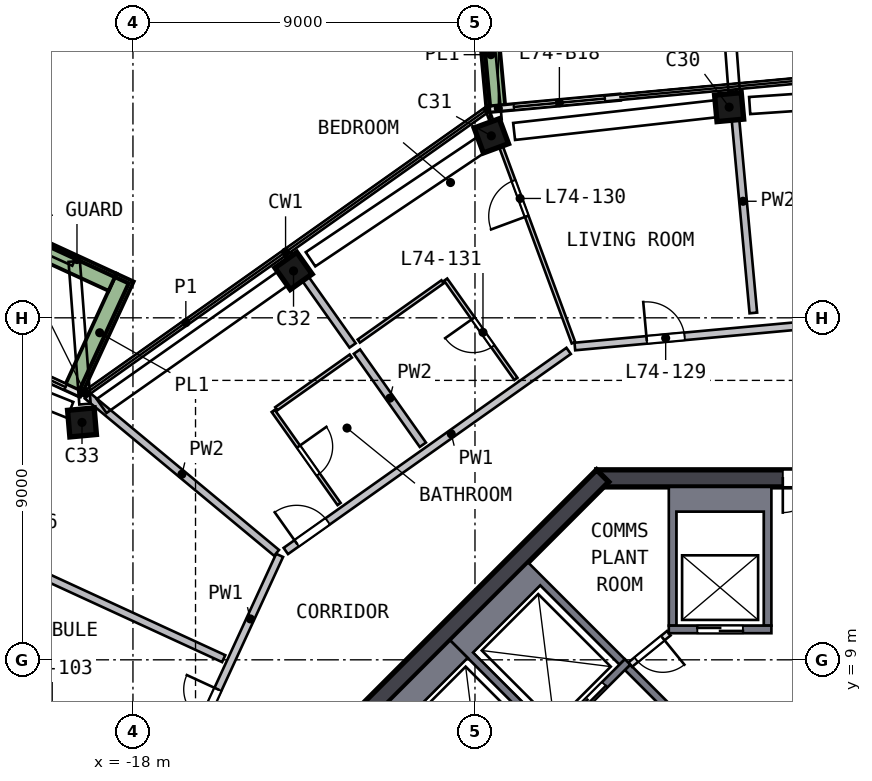
"""IFC4 building model, lengths in metres.
Left out: names, types, materials, properties, quantities, classifications, styles, units other than length and angle.
Written with IfcOpenShell. Run it as: python <this file> out.ifc"""

import sys

from ifc_helpers import new_model, si_unit, direction, frame, frame_2d, origin, origin_2d, place, context, subcontext, project, spatial, polyline, rectangle, outline, extrude, element, fill, save


model = new_model("IFC4")
c1 = context("Model", 3, precision=1e-05, world=origin(), true_north=direction((0.0, 1.0)))
c2 = subcontext(c1, "Body", "Model", "MODEL_VIEW")
j1 = project(units=[si_unit("LENGTHUNIT", "METRE"), si_unit("PLANEANGLEUNIT", "RADIAN")], contexts=[c1])
p1 = place(None, origin())
s1 = spatial("IfcSite", under=j1, at=p1, CompositionType="ELEMENT")
p2 = place(p1, origin())
s2 = spatial("IfcBuilding", under=s1, at=p2, CompositionType="ELEMENT")
p3 = place(p2, frame((0.0, 0.0, 299.5)))
s3 = spatial("IfcBuildingStorey", under=s2, at=p3, CompositionType="ELEMENT", Elevation=299.5)
p4 = place(p3, frame((-2.177, 23.558, 0.0), z_axis=(-0.112018614, -0.011255095, 0.993642367), x_axis=(-0.989472259, -0.090943405, -0.112578621)))
e1 = element("IfcColumn", 1, at=p4, inside=s3, PredefinedType="COLUMN", context=c2, shape_type="SweptSolid", body=[
    extrude(rectangle(XDim=0.7, YDim=0.7, at=origin_2d()), origin(), (0.0, 0.0, 1.0), 3.21),
])
p5 = place(p3, frame((-8.439, 22.839, 0.0), z_axis=(-0.108252285, -0.041050726, 0.993275531), x_axis=(0.931697214, 0.344292806, 0.115770316)))
e2 = element("IfcColumn", 2, at=p5, inside=s3, PredefinedType="COLUMN", context=c2, shape_type="SweptSolid", body=[
    extrude(rectangle(XDim=0.7, YDim=0.7, at=origin_2d()), origin(), (0.0, 0.0, 1.0), 3.211),
])
p6 = place(p3, frame((-13.664, 19.313, 0.0), z_axis=(-0.09133384, -0.065781659, 0.99364526), x_axis=(-0.811187112, -0.573853007, -0.112553082)))
e3 = element("IfcColumn", 3, at=p6, inside=s3, PredefinedType="COLUMN", context=c2, shape_type="SweptSolid", body=[
    extrude(rectangle(XDim=0.7, YDim=0.7, at=origin_2d()), origin(), (0.0, 0.0, 1.0), 3.21),
])
p7 = place(p3, frame((-19.253, 15.359, 0.0), z_axis=(-0.072283618, -0.092121709, 0.993120672), x_axis=(0.993191737, 0.084552132, 0.080131833)))
e4 = element("IfcColumn", 4, at=p7, inside=s3, PredefinedType="COLUMN", context=c2, shape_type="SweptSolid", body=[
    extrude(rectangle(XDim=0.7, YDim=0.7, at=origin_2d()), origin(), (0.0, 0.0, 1.0), 3.212),
])
p8 = place(p3, frame((5.799, 13.775, 0.0), z_axis=(0.0, 0.0, 1.0), x_axis=(-1.0, 0.0, 0.0)))
e5 = element("IfcWall", 5, at=p8, inside=s3, PredefinedType="SHEAR", context=c2, shape_type="SweptSolid", body=[
    extrude(rectangle(XDim=11.598, YDim=0.45, at=frame_2d((5.799, 0.0))), origin(), (0.0, 0.0, 1.0), 3.5),
])
p9 = place(p8, frame((4.899, 0.0, 0.0)))
e6 = element("IfcOpeningElement", 6, at=p9, cuts=e5, PredefinedType="OPENING", context=c2, shape_type="SweptSolid", body=[
    extrude(rectangle(XDim=1.8, YDim=2.1, at=frame_2d((0.9, 1.05))), frame((0.0, 0.235, 0.0), z_axis=(0.0, -1.0, 0.0), x_axis=(1.0, 0.0, 0.0)), (0.0, 0.0, 1.0), 0.47),
])
p10 = place(p3, frame((-5.64, 13.841, 0.0), z_axis=(0.0, 0.0, 1.0), x_axis=(-0.707106781, -0.707106781, 0.0)))
e7 = element("IfcWall", 7, at=p10, inside=s3, PredefinedType="SHEAR", context=c2, shape_type="SweptSolid", body=[
    extrude(rectangle(XDim=11.598, YDim=0.45, at=frame_2d((5.799, 0.0))), origin(), (0.0, 0.0, 1.0), 3.5),
])
p11 = place(p3, frame((-19.412, 16.01, 0.0), z_axis=(0.0, 0.0, 1.0), x_axis=(-0.908367596, 0.418172585, 0.0)))
e8 = element("IfcWall", 8, at=p11, inside=s3, PredefinedType="SOLIDWALL", context=c2, shape_type="SweptSolid", body=[
    extrude(rectangle(XDim=3.2, YDim=0.15, at=frame_2d((1.6, 0.0))), origin(), (0.0, 0.0, 1.0), 2.525),
])
p12 = place(p11, frame((0.4, 0.0, 0.0)))
e9 = element("IfcOpeningElement", 9, at=p12, cuts=e8, PredefinedType="OPENING", context=c2, shape_type="SweptSolid", body=[
    extrude(rectangle(XDim=2.4, YDim=2.4, at=frame_2d((1.2, 1.2))), frame((0.0, 0.085, 0.0), z_axis=(0.0, -1.0, 0.0), x_axis=(1.0, 0.0, 0.0)), (0.0, 0.0, 1.0), 0.17),
])
p13 = place(p3, frame((-5.186, 23.807, 0.0), z_axis=(0.0, 0.0, 1.0), x_axis=(-0.995754833, -0.092045163, 0.0)))
e10 = element("IfcWall", 10, at=p13, inside=s3, PredefinedType="SOLIDWALL", context=c2, shape_type="SweptSolid", body=[
    extrude(rectangle(XDim=3.427, YDim=0.15, at=frame_2d((1.713, 0.0))), origin(), (0.0, 0.0, 1.0), 2.525),
])
p14 = place(p13, frame((0.4, 0.0, 0.0)))
e11 = element("IfcOpeningElement", 11, at=p14, cuts=e10, PredefinedType="OPENING", context=c2, shape_type="SweptSolid", body=[
    extrude(rectangle(XDim=2.4, YDim=2.4, at=frame_2d((1.2, 1.2))), frame((0.0, 0.085, 0.0), z_axis=(0.0, -1.0, 0.0), x_axis=(1.0, 0.0, 0.0)), (0.0, 0.0, 1.0), 0.17),
])
p15 = place(p3, frame((-8.704, 26.269, 0.0), z_axis=(0.0, 0.0, 1.0), x_axis=(0.092085269, -0.995751125, 0.0)))
e12 = element("IfcWall", 12, at=p15, inside=s3, PredefinedType="SOLIDWALL", context=c2, shape_type="SweptSolid", body=[
    extrude(rectangle(XDim=2.699, YDim=0.5, at=frame_2d((1.35, 0.0))), origin(), (0.0, 0.0, 1.0), 0.7),
])
p16 = place(p3, frame((-19.544, 16.154, 0.0), z_axis=(0.0, 0.0, 1.0), x_axis=(0.418225571, 0.908343202, 0.0)))
e13 = element("IfcWall", 13, at=p16, inside=s3, PredefinedType="SOLIDWALL", context=c2, shape_type="SweptSolid", body=[
    extrude(rectangle(XDim=3.199, YDim=0.5, at=frame_2d((1.6, 0.0))), origin(), (0.0, 0.0, 1.0), 0.7),
])
p17 = place(p3, frame((-18.538, 18.938, 0.0), z_axis=(0.0, 0.0, 1.0), x_axis=(-0.908360009, 0.418189066, 0.0)))
e14 = element("IfcWall", 14, at=p17, inside=s3, PredefinedType="SOLIDWALL", context=c2, shape_type="SweptSolid", body=[
    extrude(rectangle(XDim=9.426, YDim=0.5, at=frame_2d((4.713, 0.0))), origin(), (0.0, 0.0, 1.0), 0.7),
])
p18 = place(p3, origin())
e15 = element("IfcWall", 15, at=p18, inside=s3, PredefinedType="SOLIDWALL", context=c2, shape_type="SweptSolid", body=[
    extrude(outline(polyline([(-3.9, 13.55), (-1.2, 13.55), (-1.2, 9.9), (-1.4, 9.9), (-1.4, 12.9), (-3.7, 12.9), (-3.7, 9.9), (-3.9, 9.9), (-3.9, 13.55)])), origin(), (0.0, 0.0, 1.0), 3.19),
])
p19 = place(p3, frame((-1.2, 9.8, 0.0), z_axis=(0.0, 0.0, 1.0), x_axis=(-1.0, 0.0, 0.0)))
e16 = element("IfcWall", 16, at=p19, inside=s3, PredefinedType="SOLIDWALL", context=c2, shape_type="SweptSolid", body=[
    extrude(rectangle(XDim=2.7, YDim=0.2, at=frame_2d((1.35, 0.0))), origin(), (0.0, 0.0, 1.0), 3.19),
])
p20 = place(p19, frame((0.75, 0.0, 0.0)))
e17 = element("IfcOpeningElement", 17, at=p20, cuts=e16, PredefinedType="OPENING", context=c2, shape_type="SweptSolid", body=[
    extrude(rectangle(XDim=1.2, YDim=2.1, at=frame_2d((0.6, 1.05))), frame((0.0, 0.11, 0.0), z_axis=(0.0, -1.0, 0.0), x_axis=(1.0, 0.0, 0.0)), (0.0, 0.0, 1.0), 0.22),
])
p21 = place(p3, origin())
e18 = element("IfcWall", 18, at=p21, inside=s3, PredefinedType="SOLIDWALL", context=c2, shape_type="SweptSolid", body=[
    extrude(outline(polyline([(-9.652, 9.51), (-7.601, 11.561), (-5.056, 9.016), (-5.197, 8.874), (-7.283, 10.96), (-9.051, 9.192), (-6.965, 7.106), (-7.106, 6.965), (-9.652, 9.51)])), origin(), (0.0, 0.0, 1.0), 3.19),
])
p22 = place(p3, frame((-4.985, 8.945, 0.0), z_axis=(0.0, 0.0, 1.0), x_axis=(-0.707106781, -0.707106781, 0.0)))
e19 = element("IfcWall", 19, at=p22, inside=s3, PredefinedType="SOLIDWALL", context=c2, shape_type="SweptSolid", body=[
    extrude(rectangle(XDim=2.9, YDim=0.2, at=frame_2d((1.45, 0.0))), origin(), (0.0, 0.0, 1.0), 3.19),
])
p23 = place(p22, frame((0.85, 0.0, 0.0)))
e20 = element("IfcOpeningElement", 20, at=p23, cuts=e19, PredefinedType="OPENING", context=c2, shape_type="SweptSolid", body=[
    extrude(rectangle(XDim=1.2, YDim=2.1, at=frame_2d((0.6, 1.05))), frame((0.0, 0.11, 0.0), z_axis=(0.0, -1.0, 0.0), x_axis=(1.0, 0.0, 0.0)), (0.0, 0.0, 1.0), 0.22),
])
p24 = place(p3, origin())
e21 = element("IfcWall", 21, at=p24, inside=s3, PredefinedType="SOLIDWALL", context=c2, shape_type="SweptSolid", body=[
    extrude(outline(polyline([(-11.561, 7.601), (-9.652, 9.51), (-9.192, 9.051), (-10.96, 7.283), (-8.874, 5.197), (-9.016, 5.056), (-11.561, 7.601)])), origin(), (0.0, 0.0, 1.0), 3.19),
])
p25 = place(p3, frame((-3.005, 6.823, 0.0), z_axis=(0.0, 0.0, 1.0), x_axis=(-0.707106781, 0.707106781, 0.0)))
e22 = element("IfcWall", 22, at=p25, inside=s3, PredefinedType="SOLIDWALL", context=c2, shape_type="SweptSolid", body=[
    extrude(rectangle(XDim=2.8, YDim=0.2, at=frame_2d((1.4, 0.0))), origin(), (0.0, 0.0, 1.0), 3.19),
])
p26 = place(p3, frame((-3.9, 9.7, 0.0), z_axis=(0.0, 0.0, 1.0), x_axis=(-0.775559878, -0.631274009, 0.0)))
e23 = element("IfcWall", 23, at=p26, inside=s3, PredefinedType="PARTITIONING", context=c2, shape_type="SweptSolid", body=[
    extrude(rectangle(XDim=1.308, YDim=0.15, at=frame_2d((0.654, 0.0))), origin(), (0.0, 0.0, 1.0), 3.19),
])
p27 = place(p26, frame((0.204, 0.0, 0.0)))
e24 = element("IfcOpeningElement", 24, at=p27, cuts=e23, PredefinedType="OPENING", context=c2, shape_type="SweptSolid", body=[
    extrude(rectangle(XDim=0.9, YDim=2.1, at=frame_2d((0.45, 1.05))), frame((0.0, 0.085, 0.0), z_axis=(0.0, -1.0, 0.0), x_axis=(1.0, 0.0, 0.0)), (0.0, 0.0, 1.0), 0.17),
])
p28 = place(p3, frame((-18.121, 3.104, 0.0), z_axis=(0.0, 0.0, 1.0), x_axis=(0.418187622, 0.908360673, 0.0)))
e25 = element("IfcWall", 25, at=p28, inside=s3, PredefinedType="SOLIDWALL", context=c2, shape_type="SweptSolid", body=[
    extrude(rectangle(XDim=9.517, YDim=0.2, at=frame_2d((4.758, 0.0))), origin(), (0.0, 0.0, 1.0), 3.19),
])
p29 = place(p28, frame((3.835, 0.0, 0.0)))
e26 = element("IfcOpeningElement", 26, at=p29, cuts=e25, PredefinedType="OPENING", context=c2, shape_type="SweptSolid", body=[
    extrude(rectangle(XDim=1.8, YDim=2.1, at=frame_2d((0.9, 1.05))), frame((0.0, 0.11, 0.0), z_axis=(0.0, -1.0, 0.0), x_axis=(1.0, 0.0, 0.0)), (0.0, 0.0, 1.0), 0.22),
])
p30 = place(p3, frame((-13.978, 11.864, 0.0), z_axis=(0.0, 0.0, 1.0), x_axis=(0.8163291, 0.57758705, 0.0)))
e27 = element("IfcWall", 27, at=p30, inside=s3, PredefinedType="SOLIDWALL", context=c2, shape_type="SweptSolid", body=[
    extrude(rectangle(XDim=9.117, YDim=0.2, at=frame_2d((4.558, 0.0))), origin(), (0.0, 0.0, 1.0), 3.19),
])
p31 = place(p30, frame((0.35, 0.0, 0.0)))
e28 = element("IfcOpeningElement", 28, at=p31, cuts=e27, PredefinedType="OPENING", context=c2, shape_type="SweptSolid", body=[
    extrude(rectangle(XDim=1.0, YDim=2.1, at=frame_2d((0.5, 1.05))), frame((0.0, 0.11, 0.0), z_axis=(0.0, -1.0, 0.0), x_axis=(1.0, 0.0, 0.0)), (0.0, 0.0, 1.0), 0.22),
])
p32 = place(p3, frame((-6.372, 17.245, 0.0), z_axis=(0.0, 0.0, 1.0), x_axis=(0.995758077, 0.092010069, 0.0)))
e29 = element("IfcWall", 29, at=p32, inside=s3, PredefinedType="SOLIDWALL", context=c2, shape_type="SweptSolid", body=[
    extrude(rectangle(XDim=9.316, YDim=0.2, at=frame_2d((4.658, 0.0))), origin(), (0.0, 0.0, 1.0), 3.19),
])
p33 = place(p32, frame((1.9, 0.0, 0.0)))
e30 = element("IfcOpeningElement", 30, at=p33, cuts=e29, PredefinedType="OPENING", context=c2, shape_type="SweptSolid", body=[
    extrude(rectangle(XDim=1.0, YDim=2.1, at=frame_2d((0.5, 1.05))), frame((0.0, 0.11, 0.0), z_axis=(0.0, -1.0, 0.0), x_axis=(1.0, 0.0, 0.0)), (0.0, 0.0, 1.0), 0.22),
])
p34 = place(p3, frame((-16.992, 6.035, 0.0), z_axis=(0.0, 0.0, 1.0), x_axis=(-0.908362647, 0.418183336, 0.0)))
e31 = element("IfcWall", 31, at=p34, inside=s3, PredefinedType="SOLIDWALL", context=c2, shape_type="SweptSolid", body=[
    extrude(rectangle(XDim=10.302, YDim=0.2, at=frame_2d((5.151, 0.0))), origin(), (0.0, 0.0, 1.0), 3.19),
])
p35 = place(p34, frame((2.95, 0.0, 0.0)))
e32 = element("IfcOpeningElement", 32, at=p35, cuts=e31, PredefinedType="OPENING", context=c2, shape_type="SweptSolid", body=[
    extrude(rectangle(XDim=1.0, YDim=2.1, at=frame_2d((0.5, 1.05))), frame((0.0, 0.11, 0.0), z_axis=(0.0, -1.0, 0.0), x_axis=(1.0, 0.0, 0.0)), (0.0, 0.0, 1.0), 0.22),
])
p36 = place(p3, frame((-24.97, 13.339, 0.0), z_axis=(0.0, 0.0, 1.0), x_axis=(0.908362647, -0.418183336, 0.0)))
e33 = element("IfcWall", 33, at=p36, inside=s3, PredefinedType="SOLIDWALL", context=c2, shape_type="SweptSolid", body=[
    extrude(rectangle(XDim=10.302, YDim=0.2, at=frame_2d((5.151, 0.0))), origin(), (0.0, 0.0, 1.0), 3.19),
])
p37 = place(p36, frame((2.5, 0.0, 0.0)))
e34 = element("IfcOpeningElement", 34, at=p37, cuts=e33, PredefinedType="OPENING", context=c2, shape_type="SweptSolid", body=[
    extrude(rectangle(XDim=1.0, YDim=2.1, at=frame_2d((0.5, 1.05))), frame((0.0, 0.11, 0.0), z_axis=(0.0, -1.0, 0.0), x_axis=(1.0, 0.0, 0.0)), (0.0, 0.0, 1.0), 0.22),
])
p38 = place(p3, frame((-19.202, 15.953, 0.0), z_axis=(0.0, 0.0, 1.0), x_axis=(0.769193794, -0.639015577, 0.0)))
e35 = element("IfcWall", 35, at=p38, inside=s3, PredefinedType="SOLIDWALL", context=c2, shape_type="SweptSolid", body=[
    extrude(rectangle(XDim=6.476, YDim=0.2, at=frame_2d((3.238, 0.0))), origin(), (0.0, 0.0, 1.0), 3.19),
])
p39 = place(p3, frame((-12.22, 17.272, 0.0), z_axis=(0.0, 0.0, 1.0), x_axis=(-0.577576384, 0.816336646, 0.0)))
e36 = element("IfcWall", 36, at=p39, inside=s3, PredefinedType="SOLIDWALL", context=c2, shape_type="SweptSolid", body=[
    extrude(rectangle(XDim=2.95, YDim=0.2, at=frame_2d((1.475, 0.0))), origin(), (0.0, 0.0, 1.0), 3.19),
])
p40 = place(p3, frame((-10.372, 14.66, 0.0), z_axis=(0.0, 0.0, 1.0), x_axis=(-0.57760883, 0.81631369, 0.0)))
e37 = element("IfcWall", 37, at=p40, inside=s3, PredefinedType="SOLIDWALL", context=c2, shape_type="SweptSolid", body=[
    extrude(rectangle(XDim=3.002, YDim=0.2, at=frame_2d((1.501, 0.0))), origin(), (0.0, 0.0, 1.0), 3.19),
])
p41 = place(p3, frame((-1.675, 18.128, 0.0), z_axis=(0.0, 0.0, 1.0), x_axis=(-0.092027338, 0.995756481, 0.0)))
e38 = element("IfcWall", 38, at=p41, inside=s3, PredefinedType="SOLIDWALL", context=c2, shape_type="SweptSolid", body=[
    extrude(rectangle(XDim=5.903, YDim=0.2, at=frame_2d((2.951, 0.0))), origin(), (0.0, 0.0, 1.0), 3.19),
])
p42 = place(p3, frame((-14.309, 15.55, 0.0), z_axis=(0.0, 0.0, 1.0), x_axis=(0.577529543, -0.816369786, 0.0)))
e39 = element("IfcWall", 39, at=p42, inside=s3, PredefinedType="PARTITIONING", context=c2, shape_type="SweptSolid", body=[
    extrude(rectangle(XDim=3.0, YDim=0.1, at=frame_2d((1.5, 0.0))), origin(), (0.0, 0.0, 1.0), 3.19),
])
p43 = place(p42, frame((1.15, 0.0, 0.0)))
e40 = element("IfcOpeningElement", 40, at=p43, cuts=e39, PredefinedType="OPENING", context=c2, shape_type="SweptSolid", body=[
    extrude(rectangle(XDim=0.9, YDim=2.1, at=frame_2d((0.45, 1.05))), frame((0.0, 0.06, 0.0), z_axis=(0.0, -1.0, 0.0), x_axis=(1.0, 0.0, 0.0)), (0.0, 0.0, 1.0), 0.12),
])
p44 = place(p3, frame((-14.227, 15.607, 0.0), z_axis=(0.0, 0.0, 1.0), x_axis=(0.816296303, 0.577633401, 0.0)))
e41 = element("IfcWall", 41, at=p44, inside=s3, PredefinedType="PARTITIONING", context=c2, shape_type="SweptSolid", body=[
    extrude(rectangle(XDim=2.4, YDim=0.1, at=frame_2d((1.2, 0.0))), origin(), (0.0, 0.0, 1.0), 3.19),
])
p45 = place(p3, frame((-9.853, 18.947, 0.0), z_axis=(0.0, 0.0, 1.0), x_axis=(-0.816358447, -0.57754557, 0.0)))
e42 = element("IfcWall", 42, at=p45, inside=s3, PredefinedType="PARTITIONING", context=c2, shape_type="SweptSolid", body=[
    extrude(rectangle(XDim=2.7, YDim=0.1, at=frame_2d((1.35, 0.0))), origin(), (0.0, 0.0, 1.0), 3.19),
])
p46 = place(p3, frame((-7.923, 16.393, 0.0), z_axis=(0.0, 0.0, 1.0), x_axis=(-0.577602382, 0.816318252, 0.0)))
e43 = element("IfcWall", 43, at=p46, inside=s3, PredefinedType="PARTITIONING", context=c2, shape_type="SweptSolid", body=[
    extrude(rectangle(XDim=3.2, YDim=0.1, at=frame_2d((1.6, 0.0))), origin(), (0.0, 0.0, 1.0), 3.19),
])
p47 = place(p46, frame((1.05, 0.0, 0.0)))
e44 = element("IfcOpeningElement", 44, at=p47, cuts=e43, PredefinedType="OPENING", context=c2, shape_type="SweptSolid", body=[
    extrude(rectangle(XDim=0.9, YDim=2.1, at=frame_2d((0.45, 1.05))), frame((0.0, 0.06, 0.0), z_axis=(0.0, -1.0, 0.0), x_axis=(1.0, 0.0, 0.0)), (0.0, 0.0, 1.0), 0.12),
])
p48 = place(p3, frame((-6.408, 17.342, 0.0), z_axis=(0.0, 0.0, 1.0), x_axis=(-0.346624181, 0.938004092, 0.0)))
e45 = element("IfcWall", 45, at=p48, inside=s3, PredefinedType="PARTITIONING", context=c2, shape_type="SweptSolid", body=[
    extrude(rectangle(XDim=6.476, YDim=0.1, at=frame_2d((3.238, 0.0))), origin(), (0.0, 0.0, 1.0), 3.19),
])
p49 = place(p48, frame((3.55, 0.0, 0.0)))
e46 = element("IfcOpeningElement", 46, at=p49, cuts=e45, PredefinedType="OPENING", context=c2, shape_type="SweptSolid", body=[
    extrude(rectangle(XDim=1.0, YDim=2.1, at=frame_2d((0.5, 1.05))), frame((0.0, 0.06, 0.0), z_axis=(0.0, -1.0, 0.0), x_axis=(1.0, 0.0, 0.0)), (0.0, 0.0, 1.0), 0.12),
])
p50 = place(p12, origin())
e47 = element("IfcDoor", 47, at=p50, inside=s3, OperationType="SLIDING_TO_LEFT", PredefinedType="DOOR", context=c2, shape_type="SweptSolid", body=[
    extrude(rectangle(XDim=2.4, YDim=2.4, at=frame_2d((1.2, 1.2))), frame((0.0, 0.025, 0.0), z_axis=(0.0, -1.0, 0.0), x_axis=(1.0, 0.0, 0.0)), (0.0, 0.0, 1.0), 0.05),
])
fill(e9, e47)
p51 = place(p14, origin())
e48 = element("IfcDoor", 48, at=p51, inside=s3, OperationType="SLIDING_TO_RIGHT", PredefinedType="DOOR", context=c2, shape_type="SweptSolid", body=[
    extrude(rectangle(XDim=2.4, YDim=2.4, at=frame_2d((1.2, 1.2))), frame((0.0, 0.025, 0.0), z_axis=(0.0, -1.0, 0.0), x_axis=(1.0, 0.0, 0.0)), (0.0, 0.0, 1.0), 0.05),
])
fill(e11, e48)
p52 = place(p20, origin())
e49 = element("IfcDoor", 49, at=p52, inside=s3, OperationType="DOUBLE_DOOR_SLIDING", PredefinedType="DOOR", context=c2, shape_type="SweptSolid", body=[
    extrude(rectangle(XDim=1.2, YDim=2.1, at=frame_2d((0.6, 1.05))), frame((0.0, 0.025, 0.0), z_axis=(0.0, -1.0, 0.0), x_axis=(1.0, 0.0, 0.0)), (0.0, 0.0, 1.0), 0.05),
])
fill(e17, e49)
p53 = place(p23, origin())
e50 = element("IfcDoor", 50, at=p53, inside=s3, OperationType="DOUBLE_DOOR_SLIDING", PredefinedType="DOOR", context=c2, shape_type="SweptSolid", body=[
    extrude(rectangle(XDim=1.2, YDim=2.1, at=frame_2d((0.6, 1.05))), frame((0.0, 0.025, 0.0), z_axis=(0.0, -1.0, 0.0), x_axis=(1.0, 0.0, 0.0)), (0.0, 0.0, 1.0), 0.05),
])
fill(e20, e50)
p54 = place(p9, origin())
e51 = element("IfcDoor", 51, at=p54, inside=s3, OperationType="DOUBLE_DOOR_SINGLE_SWING", PredefinedType="DOOR", context=c2, shape_type="SweptSolid", body=[
    extrude(rectangle(XDim=1.8, YDim=2.1, at=frame_2d((0.9, 1.05))), frame((0.0, 0.025, 0.0), z_axis=(0.0, -1.0, 0.0), x_axis=(1.0, 0.0, 0.0)), (0.0, 0.0, 1.0), 0.05),
])
fill(e6, e51)
p55 = place(p27, origin())
e52 = element("IfcDoor", 52, at=p55, inside=s3, OperationType="SINGLE_SWING_LEFT", PredefinedType="DOOR", context=c2, shape_type="SweptSolid", body=[
    extrude(rectangle(XDim=0.9, YDim=2.1, at=frame_2d((0.45, 1.05))), frame((0.0, 0.025, 0.0), z_axis=(0.0, -1.0, 0.0), x_axis=(1.0, 0.0, 0.0)), (0.0, 0.0, 1.0), 0.05),
])
fill(e24, e52)
p56 = place(p29, origin())
e53 = element("IfcDoor", 53, at=p56, inside=s3, OperationType="DOUBLE_DOOR_SINGLE_SWING", PredefinedType="DOOR", context=c2, shape_type="SweptSolid", body=[
    extrude(rectangle(XDim=1.8, YDim=2.1, at=frame_2d((0.9, 1.05))), frame((0.0, 0.025, 0.0), z_axis=(0.0, -1.0, 0.0), x_axis=(1.0, 0.0, 0.0)), (0.0, 0.0, 1.0), 0.05),
])
fill(e26, e53)
p57 = place(p33, origin())
e54 = element("IfcDoor", 54, at=p57, inside=s3, OperationType="SINGLE_SWING_LEFT", PredefinedType="DOOR", context=c2, shape_type="SweptSolid", body=[
    extrude(rectangle(XDim=1.0, YDim=2.1, at=frame_2d((0.5, 1.05))), frame((0.0, 0.025, 0.0), z_axis=(0.0, -1.0, 0.0), x_axis=(1.0, 0.0, 0.0)), (0.0, 0.0, 1.0), 0.05),
])
fill(e30, e54)
p58 = place(p49, origin())
e55 = element("IfcDoor", 55, at=p58, inside=s3, OperationType="SINGLE_SWING_LEFT", PredefinedType="DOOR", context=c2, shape_type="SweptSolid", body=[
    extrude(rectangle(XDim=1.0, YDim=2.1, at=frame_2d((0.5, 1.05))), frame((0.0, 0.025, 0.0), z_axis=(0.0, -1.0, 0.0), x_axis=(1.0, 0.0, 0.0)), (0.0, 0.0, 1.0), 0.05),
])
fill(e46, e55)
p59 = place(p47, origin())
e56 = element("IfcDoor", 56, at=p59, inside=s3, OperationType="SINGLE_SWING_RIGHT", PredefinedType="DOOR", context=c2, shape_type="SweptSolid", body=[
    extrude(rectangle(XDim=0.9, YDim=2.1, at=frame_2d((0.45, 1.05))), frame((0.0, 0.025, 0.0), z_axis=(0.0, -1.0, 0.0), x_axis=(1.0, 0.0, 0.0)), (0.0, 0.0, 1.0), 0.05),
])
fill(e44, e56)
p60 = place(p31, origin())
e57 = element("IfcDoor", 57, at=p60, inside=s3, OperationType="SINGLE_SWING_LEFT", PredefinedType="DOOR", context=c2, shape_type="SweptSolid", body=[
    extrude(rectangle(XDim=1.0, YDim=2.1, at=frame_2d((0.5, 1.05))), frame((0.0, 0.025, 0.0), z_axis=(0.0, -1.0, 0.0), x_axis=(1.0, 0.0, 0.0)), (0.0, 0.0, 1.0), 0.05),
])
fill(e28, e57)
p61 = place(p43, origin())
e58 = element("IfcDoor", 58, at=p61, inside=s3, OperationType="SINGLE_SWING_LEFT", PredefinedType="DOOR", context=c2, shape_type="SweptSolid", body=[
    extrude(rectangle(XDim=0.9, YDim=2.1, at=frame_2d((0.45, 1.05))), frame((0.0, 0.025, 0.0), z_axis=(0.0, -1.0, 0.0), x_axis=(1.0, 0.0, 0.0)), (0.0, 0.0, 1.0), 0.05),
])
fill(e40, e58)
save(model, sys.argv[1])
